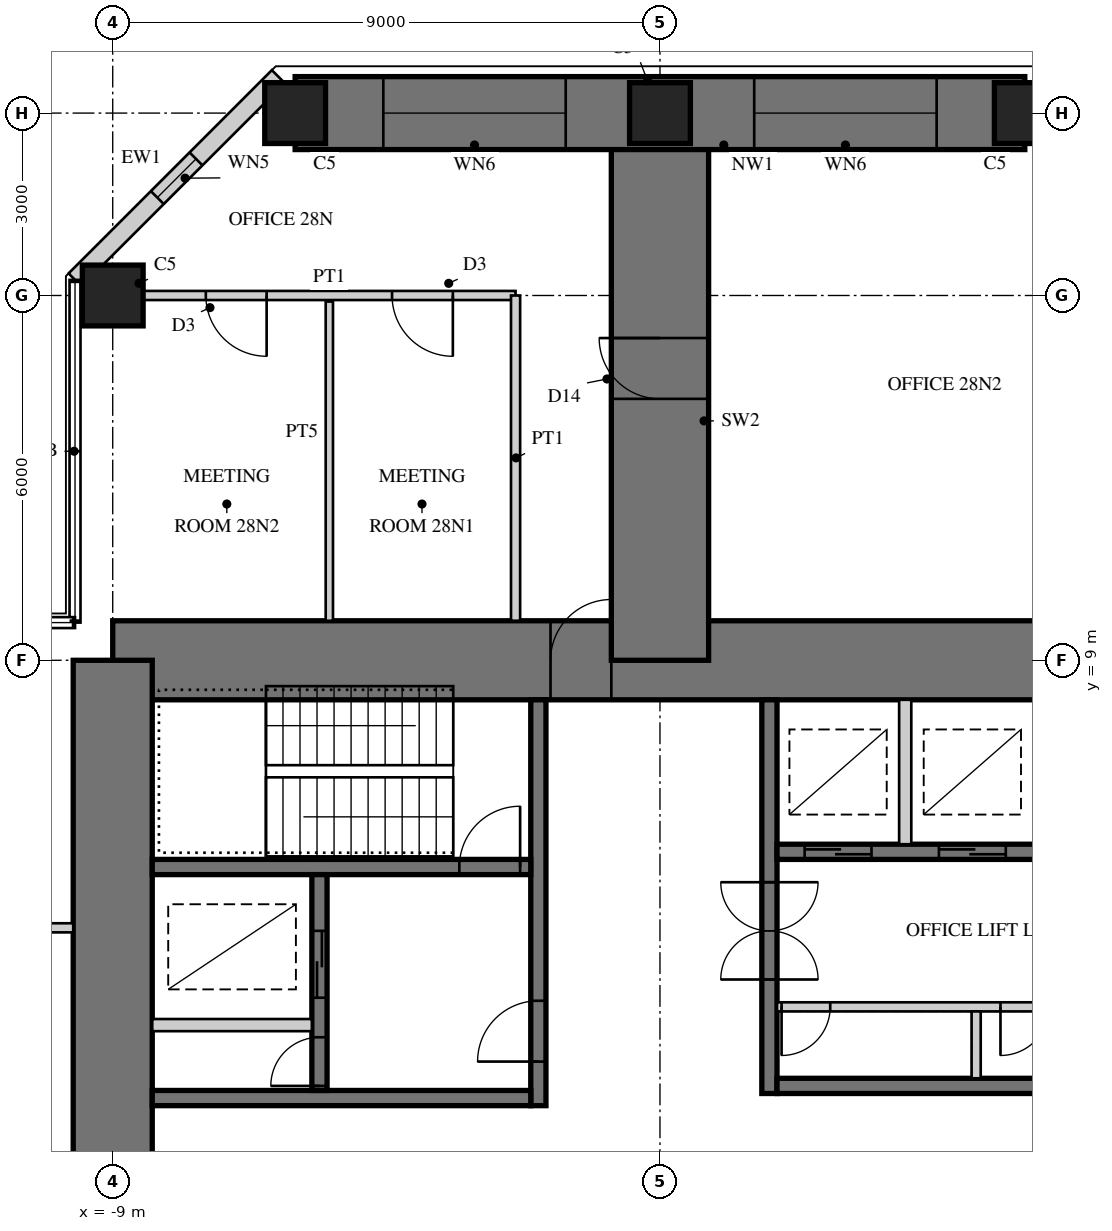
"""IFC4 building model, lengths in metres.
Left out: names, types, materials, properties, quantities, classifications, styles, units other than length and angle.
Written with IfcOpenShell. Run it as: python <this file> out.ifc"""

import sys

from ifc_helpers import new_model, si_unit, direction, frame, frame_2d, origin, origin_2d, place, context, subcontext, project, spatial, rectangle, hollow_rectangle, extrude, element, fill, save


model = new_model("IFC4")
c1 = context("Model", 3, precision=1e-05, world=origin(), true_north=direction((0.0, 1.0)))
c2 = subcontext(c1, "Body", "Model", "MODEL_VIEW")
j1 = project(units=[si_unit("LENGTHUNIT", "METRE"), si_unit("PLANEANGLEUNIT", "RADIAN")], contexts=[c1])
p1 = place(None, origin())
s1 = spatial("IfcSite", under=j1, at=p1, CompositionType="ELEMENT")
p2 = place(p1, origin())
s2 = spatial("IfcBuilding", under=s1, at=p2, CompositionType="ELEMENT")
p3 = place(p2, frame((0.0, 0.0, 116.5)))
s3 = spatial("IfcBuildingStorey", under=s2, at=p3, CompositionType="ELEMENT", Elevation=116.5)
p4 = place(p3, frame((9.0, 9.0, 0.0), z_axis=(0.0, 0.0, 1.0), x_axis=(-1.0, 0.0, 0.0)))
e1 = element("IfcWall", 1, at=p4, inside=s3, PredefinedType="SHEAR", context=c2, shape_type="SweptSolid", body=[
    extrude(rectangle(XDim=18.0, YDim=1.3, at=frame_2d((9.0, 0.0))), origin(), (0.0, 0.0, 1.0), 4.0),
])
p5 = place(p4, frame((9.8, 0.0, 0.0)))
e2 = element("IfcOpeningElement", 2, at=p5, cuts=e1, PredefinedType="OPENING", context=c2, shape_type="SweptSolid", body=[
    extrude(rectangle(XDim=1.0, YDim=2.4, at=frame_2d((0.5, 1.2))), frame((0.0, 0.66, 0.0), z_axis=(0.0, -1.0, 0.0), x_axis=(1.0, 0.0, 0.0)), (0.0, 0.0, 1.0), 1.32),
])
p6 = place(p3, frame((-9.0, 9.0, 0.0), z_axis=(0.0, 0.0, 1.0), x_axis=(0.0, -1.0, 0.0)))
e3 = element("IfcWall", 3, at=p6, inside=s3, PredefinedType="SHEAR", context=c2, shape_type="SweptSolid", body=[
    extrude(rectangle(XDim=18.0, YDim=1.3, at=frame_2d((9.0, 0.0))), origin(), (0.0, 0.0, 1.0), 4.0),
])
p7 = place(p6, frame((9.8, 0.0, 0.0)))
e4 = element("IfcOpeningElement", 4, at=p7, cuts=e3, PredefinedType="OPENING", context=c2, shape_type="SweptSolid", body=[
    extrude(rectangle(XDim=1.0, YDim=2.4, at=frame_2d((0.5, 1.2))), frame((0.0, 0.66, 0.0), z_axis=(0.0, -1.0, 0.0), x_axis=(1.0, 0.0, 0.0)), (0.0, 0.0, 1.0), 1.32),
])
p8 = place(p3, frame((1.8, 1.875, 0.0), z_axis=(0.0, 0.0, 1.0), x_axis=(0.0, 1.0, 0.0)))
e5 = element("IfcWall", 5, at=p8, inside=s3, PredefinedType="SHEAR", context=c2, shape_type="SweptSolid", body=[
    extrude(rectangle(XDim=6.475, YDim=0.25, at=frame_2d((3.238, 0.0))), origin(), (0.0, 0.0, 1.0), 4.0),
])
p9 = place(p8, frame((1.875, 0.0, 0.0)))
e6 = element("IfcOpeningElement", 6, at=p9, cuts=e5, PredefinedType="OPENING", context=c2, shape_type="SweptSolid", body=[
    extrude(rectangle(XDim=1.6, YDim=2.4, at=frame_2d((0.8, 1.2))), frame((0.0, 0.135, 0.0), z_axis=(0.0, -1.0, 0.0), x_axis=(1.0, 0.0, 0.0)), (0.0, 0.0, 1.0), 0.27),
])
p10 = place(p3, frame((1.925, 2.0, 0.0), z_axis=(0.0, 0.0, 1.0), x_axis=(1.0, 0.0, 0.0)))
e7 = element("IfcWall", 7, at=p10, inside=s3, PredefinedType="SHEAR", context=c2, shape_type="SweptSolid", body=[
    extrude(rectangle(XDim=6.425, YDim=0.25, at=frame_2d((3.212, 0.0))), origin(), (0.0, 0.0, 1.0), 4.0),
])
p11 = place(p3, frame((1.925, 5.85, 0.0), z_axis=(0.0, 0.0, 1.0), x_axis=(1.0, 0.0, 0.0)))
e8 = element("IfcWall", 8, at=p11, inside=s3, PredefinedType="SHEAR", context=c2, shape_type="SweptSolid", body=[
    extrude(rectangle(XDim=6.425, YDim=0.25, at=frame_2d((3.212, 0.0))), origin(), (0.0, 0.0, 1.0), 4.0),
])
p12 = place(p11, frame((0.454, 0.0, 0.0)))
e9 = element("IfcOpeningElement", 9, at=p12, cuts=e8, PredefinedType="OPENING", context=c2, shape_type="SweptSolid", body=[
    extrude(rectangle(XDim=1.1, YDim=2.2, at=frame_2d((0.55, 1.1))), frame((0.0, 0.135, 0.0), z_axis=(0.0, -1.0, 0.0), x_axis=(1.0, 0.0, 0.0)), (0.0, 0.0, 1.0), 0.27),
])
p13 = place(p11, frame((2.663, 0.0, 0.0)))
e10 = element("IfcOpeningElement", 10, at=p13, cuts=e8, PredefinedType="OPENING", context=c2, shape_type="SweptSolid", body=[
    extrude(rectangle(XDim=1.1, YDim=2.2, at=frame_2d((0.55, 1.1))), frame((0.0, 0.135, 0.0), z_axis=(0.0, -1.0, 0.0), x_axis=(1.0, 0.0, 0.0)), (0.0, 0.0, 1.0), 0.27),
])
p14 = place(p11, frame((4.871, 0.0, 0.0)))
e11 = element("IfcOpeningElement", 11, at=p14, cuts=e8, PredefinedType="OPENING", context=c2, shape_type="SweptSolid", body=[
    extrude(rectangle(XDim=1.1, YDim=2.2, at=frame_2d((0.55, 1.1))), frame((0.0, 0.135, 0.0), z_axis=(0.0, -1.0, 0.0), x_axis=(1.0, 0.0, 0.0)), (0.0, 0.0, 1.0), 0.27),
])
p15 = place(p3, frame((1.925, 3.3, 0.0), z_axis=(0.0, 0.0, 1.0), x_axis=(1.0, 0.0, 0.0)))
e12 = element("IfcWall", 12, at=p15, inside=s3, PredefinedType="PARTITIONING", context=c2, shape_type="SweptSolid", body=[
    extrude(rectangle(XDim=6.425, YDim=0.15, at=frame_2d((3.212, 0.0))), origin(), (0.0, 0.0, 1.0), 4.0),
])
p16 = place(p15, frame((0.075, 0.0, 0.0)))
e13 = element("IfcOpeningElement", 13, at=p16, cuts=e12, PredefinedType="OPENING", context=c2, shape_type="SweptSolid", body=[
    extrude(rectangle(XDim=0.8, YDim=2.1, at=frame_2d((0.4, 1.05))), frame((0.0, 0.085, 0.0), z_axis=(0.0, -1.0, 0.0), x_axis=(1.0, 0.0, 0.0)), (0.0, 0.0, 1.0), 0.17),
])
p17 = place(p15, frame((3.675, 0.0, 0.0)))
e14 = element("IfcOpeningElement", 14, at=p17, cuts=e12, PredefinedType="OPENING", context=c2, shape_type="SweptSolid", body=[
    extrude(rectangle(XDim=0.8, YDim=2.1, at=frame_2d((0.4, 1.05))), frame((0.0, 0.085, 0.0), z_axis=(0.0, -1.0, 0.0), x_axis=(1.0, 0.0, 0.0)), (0.0, 0.0, 1.0), 0.17),
])
p18 = place(p3, frame((5.2, 2.125, 0.0), z_axis=(0.0, 0.0, 1.0), x_axis=(0.0, 1.0, 0.0)))
e15 = element("IfcWall", 15, at=p18, inside=s3, PredefinedType="PARTITIONING", context=c2, shape_type="SweptSolid", body=[
    extrude(rectangle(XDim=1.1, YDim=0.15, at=frame_2d((0.55, 0.0))), origin(), (0.0, 0.0, 1.0), 4.0),
])
p19 = place(p3, frame((4.033, 5.975, 0.0), z_axis=(0.0, 0.0, 1.0), x_axis=(0.0, 1.0, 0.0)))
e16 = element("IfcWall", 16, at=p19, inside=s3, PredefinedType="PARTITIONING", context=c2, shape_type="SweptSolid", body=[
    extrude(rectangle(XDim=2.375, YDim=0.2, at=frame_2d((1.188, 0.0))), origin(), (0.0, 0.0, 1.0), 4.0),
])
p20 = place(p3, frame((-2.0, 1.675, 0.0), z_axis=(0.0, 0.0, 1.0), x_axis=(0.0, 1.0, 0.0)))
e17 = element("IfcWall", 17, at=p20, inside=s3, PredefinedType="SHEAR", context=c2, shape_type="SweptSolid", body=[
    extrude(rectangle(XDim=6.675, YDim=0.25, at=frame_2d((3.337, 0.0))), origin(), (0.0, 0.0, 1.0), 4.0),
])
p21 = place(p20, frame((0.725, 0.0, 0.0)))
e18 = element("IfcOpeningElement", 18, at=p21, cuts=e17, PredefinedType="OPENING", context=c2, shape_type="SweptSolid", body=[
    extrude(rectangle(XDim=1.0, YDim=2.1, at=frame_2d((0.5, 1.05))), frame((0.0, 0.135, 0.0), z_axis=(0.0, -1.0, 0.0), x_axis=(1.0, 0.0, 0.0)), (0.0, 0.0, 1.0), 0.27),
])
p22 = place(p3, frame((-2.125, 1.8, 0.0), z_axis=(0.0, 0.0, 1.0), x_axis=(-1.0, 0.0, 0.0)))
e19 = element("IfcWall", 19, at=p22, inside=s3, PredefinedType="SHEAR", context=c2, shape_type="SweptSolid", body=[
    extrude(rectangle(XDim=6.225, YDim=0.25, at=frame_2d((3.113, 0.0))), origin(), (0.0, 0.0, 1.0), 4.0),
])
p23 = place(p3, frame((-2.125, 5.6, 0.0), z_axis=(0.0, 0.0, 1.0), x_axis=(-1.0, 0.0, 0.0)))
e20 = element("IfcWall", 20, at=p23, inside=s3, PredefinedType="SHEAR", context=c2, shape_type="SweptSolid", body=[
    extrude(rectangle(XDim=6.225, YDim=0.25, at=frame_2d((3.113, 0.0))), origin(), (0.0, 0.0, 1.0), 4.0),
])
p24 = place(p23, frame((0.175, 0.0, 0.0)))
e21 = element("IfcOpeningElement", 21, at=p24, cuts=e20, PredefinedType="OPENING", context=c2, shape_type="SweptSolid", body=[
    extrude(rectangle(XDim=1.0, YDim=2.1, at=frame_2d((0.5, 1.05))), frame((0.0, 0.135, 0.0), z_axis=(0.0, -1.0, 0.0), x_axis=(1.0, 0.0, 0.0)), (0.0, 0.0, 1.0), 0.27),
])
p25 = place(p3, frame((-5.6, 1.925, 0.0), z_axis=(0.0, 0.0, 1.0), x_axis=(0.0, 1.0, 0.0)))
e22 = element("IfcWall", 22, at=p25, inside=s3, PredefinedType="SHEAR", context=c2, shape_type="SweptSolid", body=[
    extrude(rectangle(XDim=3.55, YDim=0.25, at=frame_2d((1.775, 0.0))), origin(), (0.0, 0.0, 1.0), 4.0),
])
p26 = place(p25, frame((1.525, 0.0, 0.0)))
e23 = element("IfcOpeningElement", 23, at=p26, cuts=e22, PredefinedType="OPENING", context=c2, shape_type="SweptSolid", body=[
    extrude(rectangle(XDim=1.1, YDim=2.2, at=frame_2d((0.55, 1.1))), frame((0.0, 0.135, 0.0), z_axis=(0.0, -1.0, 0.0), x_axis=(1.0, 0.0, 0.0)), (0.0, 0.0, 1.0), 0.27),
])
p27 = place(p25, frame((0.075, 0.0, 0.0)))
e24 = element("IfcOpeningElement", 24, at=p27, cuts=e22, PredefinedType="OPENING", context=c2, shape_type="SweptSolid", body=[
    extrude(rectangle(XDim=0.8, YDim=2.1, at=frame_2d((0.4, 1.05))), frame((0.0, 0.135, 0.0), z_axis=(0.0, -1.0, 0.0), x_axis=(1.0, 0.0, 0.0)), (0.0, 0.0, 1.0), 0.27),
])
p28 = place(p3, frame((-5.725, 3.0, 0.0), z_axis=(0.0, 0.0, 1.0), x_axis=(-1.0, 0.0, 0.0)))
e25 = element("IfcWall", 25, at=p28, inside=s3, PredefinedType="PARTITIONING", context=c2, shape_type="SweptSolid", body=[
    extrude(rectangle(XDim=2.625, YDim=0.2, at=frame_2d((1.312, 0.0))), origin(), (0.0, 0.0, 1.0), 4.0),
])
p29 = place(p3, frame((0.0, 9.0, 0.0), z_axis=(0.0, 0.0, 1.0), x_axis=(0.0, 1.0, 0.0)))
e26 = element("IfcWall", 26, at=p29, inside=s3, PredefinedType="SHEAR", context=c2, shape_type="SweptSolid", body=[
    extrude(rectangle(XDim=9.0, YDim=1.6, at=frame_2d((4.5, 0.0))), origin(), (0.0, 0.0, 1.0), 4.0),
])
p30 = place(p29, frame((4.3, 0.0, 0.0)))
e27 = element("IfcOpeningElement", 27, at=p30, cuts=e26, PredefinedType="OPENING", context=c2, shape_type="SweptSolid", body=[
    extrude(rectangle(XDim=1.0, YDim=2.2, at=frame_2d((0.5, 1.1))), frame((0.0, 0.81, 0.0), z_axis=(0.0, -1.0, 0.0), x_axis=(1.0, 0.0, 0.0)), (0.0, 0.0, 1.0), 1.62),
])
p31 = place(p3, frame((6.0, 18.0, 0.0), z_axis=(0.0, 0.0, 1.0), x_axis=(-1.0, 0.0, 0.0)))
e28 = element("IfcWall", 28, at=p31, inside=s3, PredefinedType="SHEAR", context=c2, shape_type="SweptSolid", body=[
    extrude(rectangle(XDim=12.0, YDim=1.2, at=frame_2d((6.0, 0.0))), origin(), (0.0, 0.0, 1.0), 4.0),
])
p32 = place(p31, frame((1.45, 0.0, 0.6)))
e29 = element("IfcOpeningElement", 29, at=p32, cuts=e28, PredefinedType="OPENING", context=c2, shape_type="SweptSolid", body=[
    extrude(rectangle(XDim=3.0, YDim=2.4, at=frame_2d((1.5, 1.2))), frame((0.0, 0.61, 0.0), z_axis=(0.0, -1.0, 0.0), x_axis=(1.0, 0.0, 0.0)), (0.0, 0.0, 1.0), 1.22),
])
p33 = place(p31, frame((7.55, 0.0, 0.6)))
e30 = element("IfcOpeningElement", 30, at=p33, cuts=e28, PredefinedType="OPENING", context=c2, shape_type="SweptSolid", body=[
    extrude(rectangle(XDim=3.0, YDim=2.4, at=frame_2d((1.5, 1.2))), frame((0.0, 0.61, 0.0), z_axis=(0.0, -1.0, 0.0), x_axis=(1.0, 0.0, 0.0)), (0.0, 0.0, 1.0), 1.22),
])
for number, where, z_axis, x_axis in (
    (31, (-9.0, 15.0, 0.0), (0.0, 0.0, 1.0), (1.0, 0.0, 0.0)),
    (32, (6.0, 18.0, 0.0), (0.0, 0.0, 1.0), (1.0, 0.0, 0.0)),
    (33, (0.0, 18.0, 0.0), (0.0, 0.0, 1.0), (1.0, 0.0, 0.0)),
    (34, (-6.0, 18.0, 0.0), (0.0, 0.0, 1.0), (1.0, 0.0, 0.0)),
):
    element("IfcColumn", number, at=place(p3, frame(where, z_axis=z_axis, x_axis=x_axis)), inside=s3, PredefinedType="COLUMN", context=c2, shape_type="SweptSolid", body=[
        extrude(rectangle(XDim=1.0, YDim=1.0, at=origin_2d()), origin(), (0.0, 0.0, 1.0), 4.0),
    ])
p34 = place(p3, frame((-6.277, 18.6, 0.0), z_axis=(0.0, 0.0, 1.0), x_axis=(-0.707106781187, -0.707106781187, 0.0)))
e35 = element("IfcWall", 35, at=p34, inside=s3, PredefinedType="SOLIDWALL", context=c2, shape_type="SweptSolid", body=[
    extrude(rectangle(XDim=4.728, YDim=0.3, at=frame_2d((2.364, 0.0))), origin(), (0.0, 0.0, 1.0), 3.8),
])
p35 = place(p34, frame((1.914, 0.0, 0.3)))
e36 = element("IfcOpeningElement", 36, at=p35, cuts=e35, PredefinedType="OPENING", context=c2, shape_type="SweptSolid", body=[
    extrude(rectangle(XDim=0.9, YDim=2.4, at=frame_2d((0.45, 1.2))), frame((0.0, 0.16, 0.0), z_axis=(0.0, -1.0, 0.0), x_axis=(1.0, 0.0, 0.0)), (0.0, 0.0, 1.0), 0.32),
])
p36 = place(p3, frame((-2.375, 15.0, 0.0), z_axis=(0.0, 0.0, 1.0), x_axis=(-1.0, 0.0, 0.0)))
e37 = element("IfcWall", 37, at=p36, inside=s3, PredefinedType="PARTITIONING", context=c2, shape_type="SweptSolid", body=[
    extrude(rectangle(XDim=6.125, YDim=0.15, at=frame_2d((3.062, 0.0))), origin(), (0.0, 0.0, 1.0), 3.0),
])
p37 = place(p36, frame((1.031, 0.0, 0.0)))
e38 = element("IfcOpeningElement", 38, at=p37, cuts=e37, PredefinedType="OPENING", context=c2, shape_type="SweptSolid", body=[
    extrude(rectangle(XDim=1.0, YDim=2.1, at=frame_2d((0.5, 1.05))), frame((0.0, 0.085, 0.0), z_axis=(0.0, -1.0, 0.0), x_axis=(1.0, 0.0, 0.0)), (0.0, 0.0, 1.0), 0.17),
])
p38 = place(p36, frame((4.094, 0.0, 0.0)))
e39 = element("IfcOpeningElement", 39, at=p38, cuts=e37, PredefinedType="OPENING", context=c2, shape_type="SweptSolid", body=[
    extrude(rectangle(XDim=1.0, YDim=2.1, at=frame_2d((0.5, 1.05))), frame((0.0, 0.085, 0.0), z_axis=(0.0, -1.0, 0.0), x_axis=(1.0, 0.0, 0.0)), (0.0, 0.0, 1.0), 0.17),
])
p39 = place(p3, frame((-2.375, 9.65, 0.0), z_axis=(0.0, 0.0, 1.0), x_axis=(0.0, 1.0, 0.0)))
e40 = element("IfcWall", 40, at=p39, inside=s3, PredefinedType="PARTITIONING", context=c2, shape_type="SweptSolid", body=[
    extrude(rectangle(XDim=5.35, YDim=0.15, at=frame_2d((2.675, 0.0))), origin(), (0.0, 0.0, 1.0), 3.8),
])
p40 = place(p3, frame((-5.438, 9.65, 0.0), z_axis=(0.0, 0.0, 1.0), x_axis=(0.0, 1.0, 0.0)))
e41 = element("IfcWall", 41, at=p40, inside=s3, PredefinedType="PLUMBINGWALL", context=c2, shape_type="SweptSolid", body=[
    extrude(rectangle(XDim=5.25, YDim=0.12, at=frame_2d((2.625, 0.0))), origin(), (0.0, 0.0, 1.0), 3.8),
])
p41 = place(p3, frame((-9.65, 4.6, 0.0), z_axis=(0.0, 0.0, 1.0), x_axis=(-1.0, 0.0, 0.0)))
e42 = element("IfcWall", 42, at=p41, inside=s3, PredefinedType="PARTITIONING", context=c2, shape_type="SweptSolid", body=[
    extrude(rectangle(XDim=5.25, YDim=0.15, at=frame_2d((2.625, 0.0))), origin(), (0.0, 0.0, 1.0), 3.8),
])
p42 = place(p32, origin())
e43 = element("IfcWindow", 43, at=p42, inside=s3, PartitioningType="SINGLE_PANEL", PredefinedType="WINDOW", context=c2, shape_type="SweptSolid", body=[
    extrude(hollow_rectangle(XDim=3.0, YDim=2.4, WallThickness=0.06, at=frame_2d((1.5, 1.2))), frame((0.0, 0.03, 0.0), z_axis=(0.0, -1.0, 0.0), x_axis=(1.0, 0.0, 0.0)), (0.0, 0.0, 1.0), 0.06),
    extrude(rectangle(XDim=2.879, YDim=2.279, at=frame_2d((1.5, 1.2))), frame((0.0, 0.03, 0.0), z_axis=(0.0, -1.0, 0.0), x_axis=(1.0, 0.0, 0.0)), (0.0, 0.0, 1.0), 0.06),
])
fill(e29, e43)
p43 = place(p33, origin())
e44 = element("IfcWindow", 44, at=p43, inside=s3, PartitioningType="SINGLE_PANEL", PredefinedType="WINDOW", context=c2, shape_type="SweptSolid", body=[
    extrude(hollow_rectangle(XDim=3.0, YDim=2.4, WallThickness=0.06, at=frame_2d((1.5, 1.2))), frame((0.0, 0.03, 0.0), z_axis=(0.0, -1.0, 0.0), x_axis=(1.0, 0.0, 0.0)), (0.0, 0.0, 1.0), 0.06),
    extrude(rectangle(XDim=2.879, YDim=2.279, at=frame_2d((1.5, 1.2))), frame((0.0, 0.03, 0.0), z_axis=(0.0, -1.0, 0.0), x_axis=(1.0, 0.0, 0.0)), (0.0, 0.0, 1.0), 0.06),
])
fill(e30, e44)
p44 = place(p35, origin())
e45 = element("IfcWindow", 45, at=p44, inside=s3, PartitioningType="SINGLE_PANEL", PredefinedType="WINDOW", context=c2, shape_type="SweptSolid", body=[
    extrude(hollow_rectangle(XDim=0.9, YDim=2.4, WallThickness=0.06, at=frame_2d((0.45, 1.2))), frame((0.0, 0.03, 0.0), z_axis=(0.0, -1.0, 0.0), x_axis=(1.0, 0.0, 0.0)), (0.0, 0.0, 1.0), 0.06),
    extrude(rectangle(XDim=0.779, YDim=2.279, at=frame_2d((0.45, 1.2))), frame((0.0, 0.03, 0.0), z_axis=(0.0, -1.0, 0.0), x_axis=(1.0, 0.0, 0.0)), (0.0, 0.0, 1.0), 0.06),
])
fill(e36, e45)
p45 = place(p37, origin())
e46 = element("IfcDoor", 46, at=p45, inside=s3, OperationType="SINGLE_SWING_LEFT", PredefinedType="DOOR", context=c2, shape_type="SweptSolid", body=[
    extrude(rectangle(XDim=1.0, YDim=2.1, at=frame_2d((0.5, 1.05))), frame((0.0, 0.025, 0.0), z_axis=(0.0, -1.0, 0.0), x_axis=(1.0, 0.0, 0.0)), (0.0, 0.0, 1.0), 0.05),
])
fill(e38, e46)
p46 = place(p38, origin())
e47 = element("IfcDoor", 47, at=p46, inside=s3, OperationType="SINGLE_SWING_LEFT", PredefinedType="DOOR", context=c2, shape_type="SweptSolid", body=[
    extrude(rectangle(XDim=1.0, YDim=2.1, at=frame_2d((0.5, 1.05))), frame((0.0, 0.025, 0.0), z_axis=(0.0, -1.0, 0.0), x_axis=(1.0, 0.0, 0.0)), (0.0, 0.0, 1.0), 0.05),
])
fill(e39, e47)
p47 = place(p30, origin())
e48 = element("IfcDoor", 48, at=p47, inside=s3, OperationType="SINGLE_SWING_RIGHT", PredefinedType="DOOR", context=c2, shape_type="SweptSolid", body=[
    extrude(rectangle(XDim=1.0, YDim=2.2, at=frame_2d((0.5, 1.1))), frame((0.0, 0.025, 0.0), z_axis=(0.0, -1.0, 0.0), x_axis=(1.0, 0.0, 0.0)), (0.0, 0.0, 1.0), 0.05),
])
fill(e27, e48)
p48 = place(p5, frame((1.0, 0.0, 0.0), z_axis=(0.0, 0.0, 1.0), x_axis=(-1.0, 0.0, 0.0)))
e49 = element("IfcDoor", 49, at=p48, inside=s3, OperationType="SINGLE_SWING_RIGHT", PredefinedType="DOOR", context=c2, shape_type="SweptSolid", body=[
    extrude(rectangle(XDim=1.0, YDim=2.4, at=frame_2d((0.5, 1.2))), frame((0.0, -0.005, 0.0), z_axis=(0.0, -1.0, 0.0), x_axis=(1.0, 0.0, 0.0)), (0.0, 0.0, 1.0), 0.05),
])
fill(e2, e49)
p49 = place(p12, origin())
e50 = element("IfcDoor", 50, at=p49, inside=s3, OperationType="DOUBLE_DOOR_SLIDING", PredefinedType="DOOR", context=c2, shape_type="SweptSolid", body=[
    extrude(rectangle(XDim=1.1, YDim=2.2, at=frame_2d((0.55, 1.1))), frame((0.0, 0.025, 0.0), z_axis=(0.0, -1.0, 0.0), x_axis=(1.0, 0.0, 0.0)), (0.0, 0.0, 1.0), 0.05),
])
fill(e9, e50)
p50 = place(p13, origin())
e51 = element("IfcDoor", 51, at=p50, inside=s3, OperationType="DOUBLE_DOOR_SLIDING", PredefinedType="DOOR", context=c2, shape_type="SweptSolid", body=[
    extrude(rectangle(XDim=1.1, YDim=2.2, at=frame_2d((0.55, 1.1))), frame((0.0, 0.025, 0.0), z_axis=(0.0, -1.0, 0.0), x_axis=(1.0, 0.0, 0.0)), (0.0, 0.0, 1.0), 0.05),
])
fill(e10, e51)
p51 = place(p9, origin())
e52 = element("IfcDoor", 52, at=p51, inside=s3, OperationType="DOUBLE_DOOR_DOUBLE_SWING", PredefinedType="DOOR", context=c2, shape_type="SweptSolid", body=[
    extrude(rectangle(XDim=1.6, YDim=2.4, at=frame_2d((0.8, 1.2))), frame((0.0, 0.025, 0.0), z_axis=(0.0, -1.0, 0.0), x_axis=(1.0, 0.0, 0.0)), (0.0, 0.0, 1.0), 0.05),
])
fill(e6, e52)
p52 = place(p16, frame((0.8, 0.0, 0.0), z_axis=(0.0, 0.0, 1.0), x_axis=(-1.0, 0.0, 0.0)))
e53 = element("IfcDoor", 53, at=p52, inside=s3, OperationType="SINGLE_SWING_RIGHT", PredefinedType="DOOR", context=c2, shape_type="SweptSolid", body=[
    extrude(rectangle(XDim=0.8, YDim=2.1, at=frame_2d((0.4, 1.05))), frame((0.0, 0.025, 0.0), z_axis=(0.0, -1.0, 0.0), x_axis=(1.0, 0.0, 0.0)), (0.0, 0.0, 1.0), 0.05),
])
fill(e13, e53)
p53 = place(p17, frame((0.8, 0.0, 0.0), z_axis=(0.0, 0.0, 1.0), x_axis=(-1.0, 0.0, 0.0)))
e54 = element("IfcDoor", 54, at=p53, inside=s3, OperationType="SINGLE_SWING_RIGHT", PredefinedType="DOOR", context=c2, shape_type="SweptSolid", body=[
    extrude(rectangle(XDim=0.8, YDim=2.1, at=frame_2d((0.4, 1.05))), frame((0.0, 0.025, 0.0), z_axis=(0.0, -1.0, 0.0), x_axis=(1.0, 0.0, 0.0)), (0.0, 0.0, 1.0), 0.05),
])
fill(e14, e54)
p54 = place(p21, origin())
e55 = element("IfcDoor", 55, at=p54, inside=s3, OperationType="SINGLE_SWING_LEFT", PredefinedType="DOOR", context=c2, shape_type="SweptSolid", body=[
    extrude(rectangle(XDim=1.0, YDim=2.1, at=frame_2d((0.5, 1.05))), frame((0.0, 0.025, 0.0), z_axis=(0.0, -1.0, 0.0), x_axis=(1.0, 0.0, 0.0)), (0.0, 0.0, 1.0), 0.05),
])
fill(e18, e55)
p55 = place(p24, frame((1.0, 0.0, 0.0), z_axis=(0.0, 0.0, 1.0), x_axis=(-1.0, 0.0, 0.0)))
e56 = element("IfcDoor", 56, at=p55, inside=s3, OperationType="SINGLE_SWING_RIGHT", PredefinedType="DOOR", context=c2, shape_type="SweptSolid", body=[
    extrude(rectangle(XDim=1.0, YDim=2.1, at=frame_2d((0.5, 1.05))), frame((0.0, 0.025, 0.0), z_axis=(0.0, -1.0, 0.0), x_axis=(1.0, 0.0, 0.0)), (0.0, 0.0, 1.0), 0.05),
])
fill(e21, e56)
p56 = place(p26, origin())
e57 = element("IfcDoor", 57, at=p56, inside=s3, OperationType="DOUBLE_DOOR_SLIDING", PredefinedType="DOOR", context=c2, shape_type="SweptSolid", body=[
    extrude(rectangle(XDim=1.1, YDim=2.2, at=frame_2d((0.55, 1.1))), frame((0.0, 0.025, 0.0), z_axis=(0.0, -1.0, 0.0), x_axis=(1.0, 0.0, 0.0)), (0.0, 0.0, 1.0), 0.05),
])
fill(e23, e57)
p57 = place(p27, origin())
e58 = element("IfcDoor", 58, at=p57, inside=s3, OperationType="SINGLE_SWING_LEFT", PredefinedType="DOOR", context=c2, shape_type="SweptSolid", body=[
    extrude(rectangle(XDim=0.8, YDim=2.1, at=frame_2d((0.4, 1.05))), frame((0.0, 0.025, 0.0), z_axis=(0.0, -1.0, 0.0), x_axis=(1.0, 0.0, 0.0)), (0.0, 0.0, 1.0), 0.05),
])
fill(e24, e58)
save(model, sys.argv[1])
